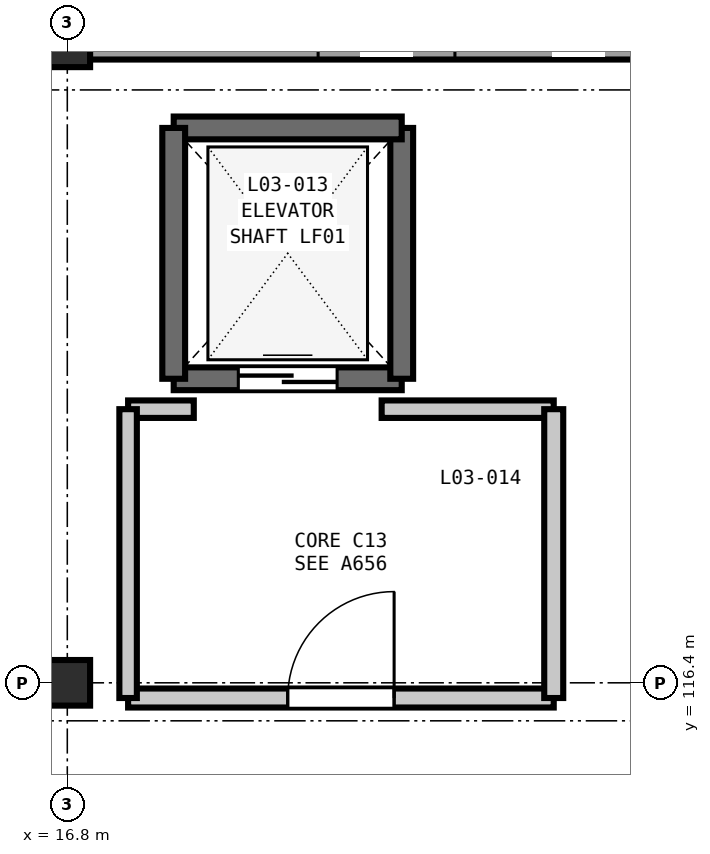
"""IFC4 building model, lengths in metres.
Left out: names, types, materials, properties, quantities, classifications, styles, units other than length and angle.
Written with IfcOpenShell. Run it as: python <this file> out.ifc"""

import sys

from ifc_helpers import new_model, si_unit, direction, frame, frame_2d, origin, origin_2d, place, context, subcontext, project, spatial, rectangle, extrude, element, fill, save


model = new_model("IFC4")
c1 = context("Model", 3, precision=1e-05, world=origin(), true_north=direction((0.0, 1.0)))
c2 = subcontext(c1, "Body", "Model", "MODEL_VIEW")
j1 = project(units=[si_unit("LENGTHUNIT", "METRE"), si_unit("PLANEANGLEUNIT", "RADIAN")], contexts=[c1])
p1 = place(None, origin())
s1 = spatial("IfcSite", under=j1, at=p1, CompositionType="ELEMENT")
p2 = place(p1, origin())
s2 = spatial("IfcBuilding", under=s1, at=p2, CompositionType="ELEMENT")
p3 = place(p2, frame((0.0, 0.0, 16.2)))
s3 = spatial("IfcBuildingStorey", under=s2, at=p3, CompositionType="ELEMENT", Elevation=16.2)
for number, where, z_axis, x_axis in (
    (1, (16.8, 116.4, 0.0), (0.0, 0.0, 1.0), (1.0, 0.0, 0.0)),
    (2, (16.8, 124.8, 0.0), (0.0, 0.0, 1.0), (1.0, 0.0, 0.0)),
):
    element("IfcColumn", number, at=place(p3, frame(where, z_axis=z_axis, x_axis=x_axis)), inside=s3, PredefinedType="COLUMN", context=c2, shape_type="SweptSolid", body=[
        extrude(rectangle(XDim=0.6, YDim=0.6, at=origin_2d()), origin(), (0.0, 0.0, 1.0), 4.2),
    ])
p4 = place(p3, frame((17.098, 124.8, 0.0), z_axis=(0.0, 0.0, 1.0), x_axis=(1.0, 0.0, 0.0)))
e3 = element("IfcWall", 3, at=p4, inside=s3, PredefinedType="SOLIDWALL", context=c2, shape_type="SweptSolid", body=[
    extrude(rectangle(XDim=7.804, YDim=0.4, at=frame_2d((3.902, 0.0))), origin(), (0.0, 0.0, 1.0), 3.48),
])
p5 = place(p4, frame((3.002, 0.0, 0.9)))
e4 = element("IfcOpeningElement", 4, at=p5, cuts=e3, PredefinedType="OPENING", context=c2, shape_type="SweptSolid", body=[
    extrude(rectangle(XDim=1.8, YDim=1.95, at=frame_2d((0.9, 0.975))), frame((0.0, 0.21, 0.0), z_axis=(0.0, -1.0, 0.0), x_axis=(1.0, 0.0, 0.0)), (0.0, 0.0, 1.0), 0.42),
])
p6 = place(p3, frame((18.2, 120.4, 0.0), z_axis=(0.0, 0.0, 1.0), x_axis=(1.0, 0.0, 0.0)))
e5 = element("IfcWall", 5, at=p6, inside=s3, PredefinedType="SHEAR", context=c2, shape_type="SweptSolid", body=[
    extrude(rectangle(XDim=3.0, YDim=0.3, at=frame_2d((1.5, 0.0))), origin(), (0.0, 0.0, 1.0), 4.2),
])
p7 = place(p6, frame((0.85, 0.0, 0.0)))
e6 = element("IfcOpeningElement", 6, at=p7, cuts=e5, PredefinedType="OPENING", context=c2, shape_type="SweptSolid", body=[
    extrude(rectangle(XDim=1.3, YDim=2.2, at=frame_2d((0.65, 1.1))), frame((0.0, 0.16, 0.0), z_axis=(0.0, -1.0, 0.0), x_axis=(1.0, 0.0, 0.0)), (0.0, 0.0, 1.0), 0.32),
])
p8 = place(p3, frame((21.2, 120.4, 0.0), z_axis=(0.0, 0.0, 1.0), x_axis=(0.0, 1.0, 0.0)))
e7 = element("IfcWall", 7, at=p8, inside=s3, PredefinedType="SHEAR", context=c2, shape_type="SweptSolid", body=[
    extrude(rectangle(XDim=3.3, YDim=0.3, at=frame_2d((1.65, 0.0))), origin(), (0.0, 0.0, 1.0), 4.2),
])
p9 = place(p3, frame((21.2, 123.7, 0.0), z_axis=(0.0, 0.0, 1.0), x_axis=(-1.0, 0.0, 0.0)))
e8 = element("IfcWall", 8, at=p9, inside=s3, PredefinedType="SHEAR", context=c2, shape_type="SweptSolid", body=[
    extrude(rectangle(XDim=3.0, YDim=0.3, at=frame_2d((1.5, 0.0))), origin(), (0.0, 0.0, 1.0), 4.2),
])
p10 = place(p3, frame((18.2, 123.7, 0.0), z_axis=(0.0, 0.0, 1.0), x_axis=(0.0, -1.0, 0.0)))
e9 = element("IfcWall", 9, at=p10, inside=s3, PredefinedType="SHEAR", context=c2, shape_type="SweptSolid", body=[
    extrude(rectangle(XDim=3.3, YDim=0.3, at=frame_2d((1.65, 0.0))), origin(), (0.0, 0.0, 1.0), 4.2),
])
p11 = place(p3, frame((17.6, 116.2, 0.0), z_axis=(0.0, 0.0, 1.0), x_axis=(1.0, 0.0, 0.0)))
e10 = element("IfcWall", 10, at=p11, inside=s3, PredefinedType="PARTITIONING", context=c2, shape_type="SweptSolid", body=[
    extrude(rectangle(XDim=5.6, YDim=0.25, at=frame_2d((2.8, 0.0))), origin(), (0.0, 0.0, 1.0), 3.535),
])
p12 = place(p11, frame((2.1, 0.0, 0.0)))
e11 = element("IfcOpeningElement", 11, at=p12, cuts=e10, PredefinedType="OPENING", context=c2, shape_type="SweptSolid", body=[
    extrude(rectangle(XDim=1.4, YDim=2.2, at=frame_2d((0.7, 1.1))), frame((0.0, 0.135, 0.0), z_axis=(0.0, -1.0, 0.0), x_axis=(1.0, 0.0, 0.0)), (0.0, 0.0, 1.0), 0.27),
])
p13 = place(p3, frame((20.936, 120.0, 0.0), z_axis=(0.0, 0.0, 1.0), x_axis=(1.0, 0.0, 0.0)))
e12 = element("IfcWall", 12, at=p13, inside=s3, PredefinedType="PARTITIONING", context=c2, shape_type="SweptSolid", body=[
    extrude(rectangle(XDim=2.264, YDim=0.23, at=frame_2d((1.132, 0.0))), origin(), (0.0, 0.0, 1.0), 3.89),
])
p14 = place(p3, frame((17.6, 120.0, 0.0), z_axis=(0.0, 0.0, 1.0), x_axis=(1.0, 0.0, 0.0)))
e13 = element("IfcWall", 13, at=p14, inside=s3, PredefinedType="PARTITIONING", context=c2, shape_type="SweptSolid", body=[
    extrude(rectangle(XDim=0.864, YDim=0.23, at=frame_2d((0.432, 0.0))), origin(), (0.0, 0.0, 1.0), 3.89),
])
p15 = place(p3, frame((17.6, 116.2, 0.0), z_axis=(0.0, 0.0, 1.0), x_axis=(0.0, 1.0, 0.0)))
e14 = element("IfcWall", 14, at=p15, inside=s3, PredefinedType="PARTITIONING", context=c2, shape_type="SweptSolid", body=[
    extrude(rectangle(XDim=3.8, YDim=0.23, at=frame_2d((1.9, 0.0))), origin(), (0.0, 0.0, 1.0), 3.89),
])
p16 = place(p3, frame((23.2, 116.2, 0.0), z_axis=(0.0, 0.0, 1.0), x_axis=(0.0, 1.0, 0.0)))
e15 = element("IfcWall", 15, at=p16, inside=s3, PredefinedType="PARTITIONING", context=c2, shape_type="SweptSolid", body=[
    extrude(rectangle(XDim=3.8, YDim=0.25, at=frame_2d((1.9, 0.0))), origin(), (0.0, 0.0, 1.0), 3.89),
])
p17 = place(p7, origin())
e16 = element("IfcDoor", 16, at=p17, inside=s3, OperationType="DOUBLE_DOOR_SLIDING", PredefinedType="DOOR", context=c2, shape_type="SweptSolid", body=[
    extrude(rectangle(XDim=1.3, YDim=2.2, at=frame_2d((0.65, 1.1))), frame((0.0, 0.025, 0.0), z_axis=(0.0, -1.0, 0.0), x_axis=(1.0, 0.0, 0.0)), (0.0, 0.0, 1.0), 0.05),
])
fill(e6, e16)
p18 = place(p12, origin())
e17 = element("IfcDoor", 17, at=p18, inside=s3, OperationType="SINGLE_SWING_RIGHT", PredefinedType="DOOR", context=c2, shape_type="SweptSolid", body=[
    extrude(rectangle(XDim=1.4, YDim=2.2, at=frame_2d((0.7, 1.1))), frame((0.0, 0.025, 0.0), z_axis=(0.0, -1.0, 0.0), x_axis=(1.0, 0.0, 0.0)), (0.0, 0.0, 1.0), 0.05),
])
fill(e11, e17)
save(model, sys.argv[1])
